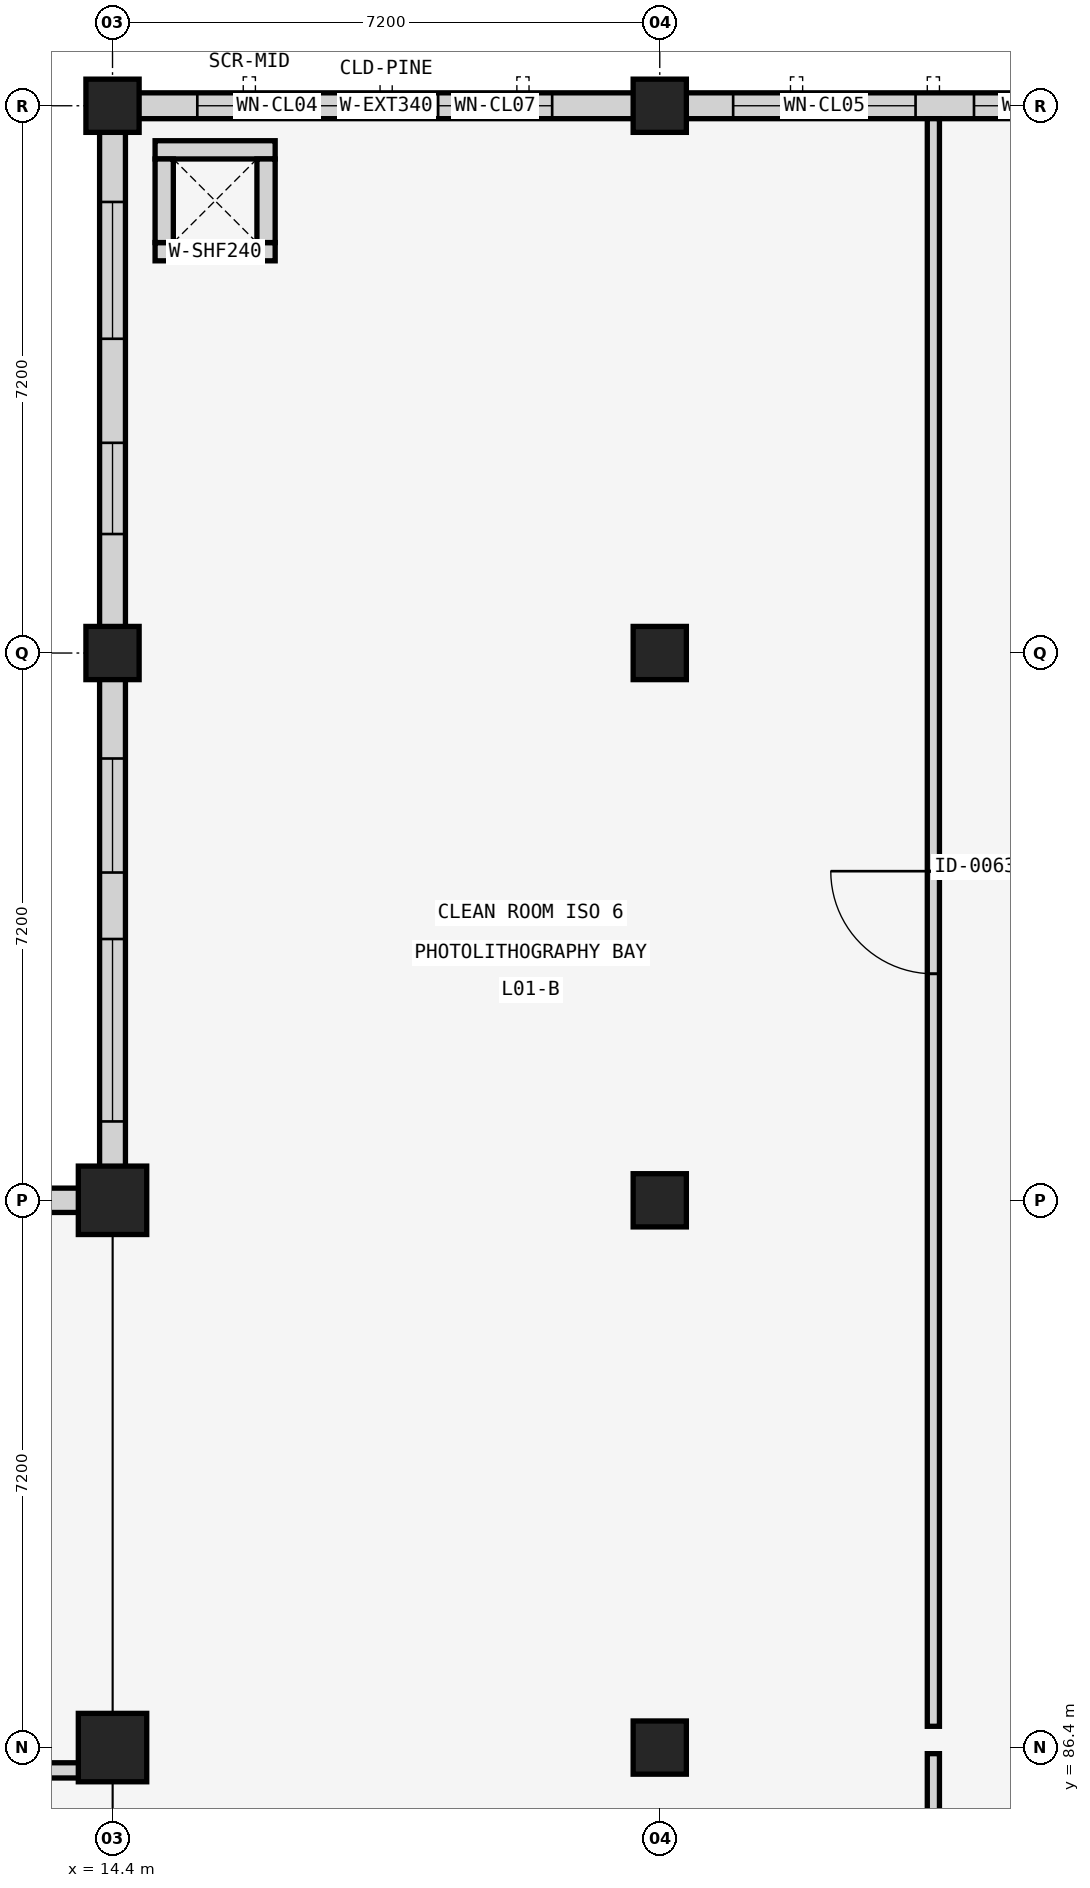
"""IFC4 building model, lengths in metres.
Left out: names, types, materials, properties, quantities, classifications, styles, units other than length and angle.
Written with IfcOpenShell. Run it as: python <this file> out.ifc"""

import sys

from ifc_helpers import new_model, si_unit, direction, frame, frame_2d, origin, origin_2d, place, context, subcontext, project, spatial, rectangle, extrude, element, fill, save


model = new_model("IFC4")
c1 = context("Model", 3, precision=1e-05, world=origin(), true_north=direction((0.0, 1.0)))
c2 = subcontext(c1, "Body", "Model", "MODEL_VIEW")
j1 = project(units=[si_unit("LENGTHUNIT", "METRE"), si_unit("PLANEANGLEUNIT", "RADIAN")], contexts=[c1])
p1 = place(None, origin())
s1 = spatial("IfcSite", under=j1, at=p1, CompositionType="ELEMENT")
p2 = place(p1, origin())
s2 = spatial("IfcBuilding", under=s1, at=p2, CompositionType="ELEMENT")
p3 = place(p2, frame((0.0, 0.0, 4.8)))
s3 = spatial("IfcBuildingStorey", under=s2, at=p3, CompositionType="ELEMENT", Elevation=4.8)
for number, where, z_axis, x_axis in (
    (1, (14.4, 86.4, 0.0), (0.0, 0.0, 1.0), (1.0, 0.0, 0.0)),
    (2, (14.4, 93.6, 0.0), (0.0, 0.0, 1.0), (1.0, 0.0, 0.0)),
):
    element("IfcColumn", number, at=place(p3, frame(where, z_axis=z_axis, x_axis=x_axis)), inside=s3, PredefinedType="COLUMN", context=c2, shape_type="SweptSolid", body=[
        extrude(rectangle(XDim=0.9, YDim=0.9, at=origin_2d()), origin(), (0.0, 0.0, 1.0), 4.16),
    ])
for number, where, z_axis, x_axis in (
    (3, (14.4, 100.8, 0.0), (0.0, 0.0, 1.0), (1.0, 0.0, 0.0)),
    (4, (14.4, 108.0, 0.0), (0.0, 0.0, 1.0), (1.0, 0.0, 0.0)),
    (5, (21.6, 86.4, 0.0), (0.0, 0.0, 1.0), (1.0, 0.0, 0.0)),
    (6, (21.6, 93.6, 0.0), (0.0, 0.0, 1.0), (1.0, 0.0, 0.0)),
    (7, (21.6, 100.8, 0.0), (0.0, 0.0, 1.0), (1.0, 0.0, 0.0)),
    (8, (21.6, 108.0, 0.0), (0.0, 0.0, 1.0), (1.0, 0.0, 0.0)),
):
    element("IfcColumn", number, at=place(p3, frame(where, z_axis=z_axis, x_axis=x_axis)), inside=s3, PredefinedType="COLUMN", context=c2, shape_type="SweptSolid", body=[
        extrude(rectangle(XDim=0.7, YDim=0.7, at=origin_2d()), origin(), (0.0, 0.0, 1.0), 4.16),
    ])
p4 = place(p3, frame((0.44, 93.6, 0.0), z_axis=(0.0, 0.0, 1.0), x_axis=(1.0, 0.0, 0.0)))
e9 = element("IfcWall", 9, at=p4, inside=s3, PredefinedType="SOLIDWALL", context=c2, shape_type="SweptSolid", body=[
    extrude(rectangle(XDim=13.52, YDim=0.32, at=frame_2d((6.76, 0.0))), origin(), (0.0, 0.0, 1.0), 3.42),
])
p5 = place(p4, frame((2.175, 0.0, 0.85)))
e10 = element("IfcOpeningElement", 10, at=p5, cuts=e9, PredefinedType="OPENING", context=c2, shape_type="SweptSolid", body=[
    extrude(rectangle(XDim=0.45, YDim=2.1, at=frame_2d((0.225, 1.05))), frame((0.0, 0.17, 0.0), z_axis=(0.0, -1.0, 0.0), x_axis=(1.0, 0.0, 0.0)), (0.0, 0.0, 1.0), 0.34),
])
p6 = place(p4, frame((4.975, 0.0, 0.85)))
e11 = element("IfcOpeningElement", 11, at=p6, cuts=e9, PredefinedType="OPENING", context=c2, shape_type="SweptSolid", body=[
    extrude(rectangle(XDim=0.45, YDim=2.4, at=frame_2d((0.225, 1.2))), frame((0.0, 0.17, 0.0), z_axis=(0.0, -1.0, 0.0), x_axis=(1.0, 0.0, 0.0)), (0.0, 0.0, 1.0), 0.34),
])
p7 = place(p4, frame((8.95, 0.0, 0.85)))
e12 = element("IfcOpeningElement", 12, at=p7, cuts=e9, PredefinedType="OPENING", context=c2, shape_type="SweptSolid", body=[
    extrude(rectangle(XDim=0.5, YDim=2.4, at=frame_2d((0.25, 1.2))), frame((0.0, 0.17, 0.0), z_axis=(0.0, -1.0, 0.0), x_axis=(1.0, 0.0, 0.0)), (0.0, 0.0, 1.0), 0.34),
])
p8 = place(p4, frame((11.725, 0.0, 0.85)))
e13 = element("IfcOpeningElement", 13, at=p8, cuts=e9, PredefinedType="OPENING", context=c2, shape_type="SweptSolid", body=[
    extrude(rectangle(XDim=0.55, YDim=2.2, at=frame_2d((0.275, 1.1))), frame((0.0, 0.17, 0.0), z_axis=(0.0, -1.0, 0.0), x_axis=(1.0, 0.0, 0.0)), (0.0, 0.0, 1.0), 0.34),
])
p9 = place(p3, frame((14.74, 108.0, 0.0), z_axis=(0.0, 0.0, 1.0), x_axis=(1.0, 0.0, 0.0)))
e14 = element("IfcWall", 14, at=p9, inside=s3, PredefinedType="SOLIDWALL", context=c2, shape_type="SweptSolid", body=[
    extrude(rectangle(XDim=6.52, YDim=0.34, at=frame_2d((3.26, 0.0))), origin(), (0.0, 0.0, 1.0), 3.42),
])
p10 = place(p9, frame((0.776, 0.0, 1.0)))
e15 = element("IfcOpeningElement", 15, at=p10, cuts=e14, PredefinedType="OPENING", context=c2, shape_type="SweptSolid", body=[
    extrude(rectangle(XDim=2.1, YDim=1.5, at=frame_2d((1.05, 0.75))), frame((0.0, 0.18, 0.0), z_axis=(0.0, -1.0, 0.0), x_axis=(1.0, 0.0, 0.0)), (0.0, 0.0, 1.0), 0.36),
])
p11 = place(p9, frame((3.944, 0.0, 1.0)))
e16 = element("IfcOpeningElement", 16, at=p11, cuts=e14, PredefinedType="OPENING", context=c2, shape_type="SweptSolid", body=[
    extrude(rectangle(XDim=1.5, YDim=1.65, at=frame_2d((0.75, 0.825))), frame((0.0, 0.18, 0.0), z_axis=(0.0, -1.0, 0.0), x_axis=(1.0, 0.0, 0.0)), (0.0, 0.0, 1.0), 0.36),
])
p12 = place(p3, frame((21.94, 108.0, 0.0), z_axis=(0.0, 0.0, 1.0), x_axis=(1.0, 0.0, 0.0)))
e17 = element("IfcWall", 17, at=p12, inside=s3, PredefinedType="SOLIDWALL", context=c2, shape_type="SweptSolid", body=[
    extrude(rectangle(XDim=6.52, YDim=0.34, at=frame_2d((3.26, 0.0))), origin(), (0.0, 0.0, 1.0), 3.21),
])
p13 = place(p12, frame((0.625, 0.0, 1.0)))
e18 = element("IfcOpeningElement", 18, at=p13, cuts=e17, PredefinedType="OPENING", context=c2, shape_type="SweptSolid", body=[
    extrude(rectangle(XDim=2.4, YDim=1.5, at=frame_2d((1.2, 0.75))), frame((0.0, 0.18, 0.0), z_axis=(0.0, -1.0, 0.0), x_axis=(1.0, 0.0, 0.0)), (0.0, 0.0, 1.0), 0.36),
])
p14 = place(p12, frame((3.794, 0.0, 1.0)))
e19 = element("IfcOpeningElement", 19, at=p14, cuts=e17, PredefinedType="OPENING", context=c2, shape_type="SweptSolid", body=[
    extrude(rectangle(XDim=1.8, YDim=1.65, at=frame_2d((0.9, 0.825))), frame((0.0, 0.18, 0.0), z_axis=(0.0, -1.0, 0.0), x_axis=(1.0, 0.0, 0.0)), (0.0, 0.0, 1.0), 0.36),
])
p15 = place(p3, frame((14.4, 94.04, 0.0), z_axis=(0.0, 0.0, 1.0), x_axis=(0.0, 1.0, 0.0)))
e20 = element("IfcWall", 20, at=p15, inside=s3, PredefinedType="SOLIDWALL", context=c2, shape_type="SweptSolid", body=[
    extrude(rectangle(XDim=6.42, YDim=0.34, at=frame_2d((3.21, 0.0))), origin(), (0.0, 0.0, 1.0), 3.21),
])
p16 = place(p15, frame((0.598, 0.0, 1.0)))
e21 = element("IfcOpeningElement", 21, at=p16, cuts=e20, PredefinedType="OPENING", context=c2, shape_type="SweptSolid", body=[
    extrude(rectangle(XDim=2.4, YDim=1.5, at=frame_2d((1.2, 0.75))), frame((0.0, 0.18, 0.0), z_axis=(0.0, -1.0, 0.0), x_axis=(1.0, 0.0, 0.0)), (0.0, 0.0, 1.0), 0.36),
])
p17 = place(p15, frame((3.872, 0.0, 1.0)))
e22 = element("IfcOpeningElement", 22, at=p17, cuts=e20, PredefinedType="OPENING", context=c2, shape_type="SweptSolid", body=[
    extrude(rectangle(XDim=1.5, YDim=1.65, at=frame_2d((0.75, 0.825))), frame((0.0, 0.18, 0.0), z_axis=(0.0, -1.0, 0.0), x_axis=(1.0, 0.0, 0.0)), (0.0, 0.0, 1.0), 0.36),
])
p18 = place(p3, frame((14.4, 101.14, 0.0), z_axis=(0.0, 0.0, 1.0), x_axis=(0.0, 1.0, 0.0)))
e23 = element("IfcWall", 23, at=p18, inside=s3, PredefinedType="SOLIDWALL", context=c2, shape_type="SweptSolid", body=[
    extrude(rectangle(XDim=6.52, YDim=0.34, at=frame_2d((3.26, 0.0))), origin(), (0.0, 0.0, 1.0), 3.21),
])
p19 = place(p18, frame((1.226, 0.0, 1.0)))
e24 = element("IfcOpeningElement", 24, at=p19, cuts=e23, PredefinedType="OPENING", context=c2, shape_type="SweptSolid", body=[
    extrude(rectangle(XDim=1.2, YDim=1.65, at=frame_2d((0.6, 0.825))), frame((0.0, 0.18, 0.0), z_axis=(0.0, -1.0, 0.0), x_axis=(1.0, 0.0, 0.0)), (0.0, 0.0, 1.0), 0.36),
])
p20 = place(p18, frame((3.794, 0.0, 1.0)))
e25 = element("IfcOpeningElement", 25, at=p20, cuts=e23, PredefinedType="OPENING", context=c2, shape_type="SweptSolid", body=[
    extrude(rectangle(XDim=1.8, YDim=1.65, at=frame_2d((0.9, 0.825))), frame((0.0, 0.18, 0.0), z_axis=(0.0, -1.0, 0.0), x_axis=(1.0, 0.0, 0.0)), (0.0, 0.0, 1.0), 0.36),
])
p21 = place(p3, frame((0.25, 86.1, 0.0), z_axis=(0.0, 0.0, 1.0), x_axis=(1.0, 0.0, 0.0)))
e26 = element("IfcWall", 26, at=p21, inside=s3, PredefinedType="PARTITIONING", context=c2, shape_type="SweptSolid", body=[
    extrude(rectangle(XDim=13.95, YDim=0.2, at=frame_2d((6.975, 0.0))), origin(), (0.0, 0.0, 1.0), 3.21),
])
p22 = place(p21, frame((4.403, 0.0, 0.0)))
e27 = element("IfcOpeningElement", 27, at=p22, cuts=e26, PredefinedType="OPENING", context=c2, shape_type="SweptSolid", body=[
    extrude(rectangle(XDim=0.96, YDim=2.15, at=frame_2d((0.48, 1.075))), frame((0.0, 0.11, 0.0), z_axis=(0.0, -1.0, 0.0), x_axis=(1.0, 0.0, 0.0)), (0.0, 0.0, 1.0), 0.22),
])
p23 = place(p3, frame((25.2, 79.28, 0.0), z_axis=(0.0, 0.0, 1.0), x_axis=(0.0, 1.0, 0.0)))
e28 = element("IfcWall", 28, at=p23, inside=s3, PredefinedType="PARTITIONING", context=c2, shape_type="SweptSolid", body=[
    extrude(rectangle(XDim=7.04, YDim=0.16, at=frame_2d((3.52, 0.0))), origin(), (0.0, 0.0, 1.0), 3.11),
])
p24 = place(p23, frame((2.92, 0.0, 0.0)))
e29 = element("IfcOpeningElement", 29, at=p24, cuts=e28, PredefinedType="OPENING", context=c2, shape_type="SweptSolid", body=[
    extrude(rectangle(XDim=1.2, YDim=2.15, at=frame_2d((0.6, 1.075))), frame((0.0, 0.09, 0.0), z_axis=(0.0, -1.0, 0.0), x_axis=(1.0, 0.0, 0.0)), (0.0, 0.0, 1.0), 0.18),
])
p25 = place(p3, frame((25.2, 86.68, 0.0), z_axis=(0.0, 0.0, 1.0), x_axis=(0.0, 1.0, 0.0)))
e30 = element("IfcWall", 30, at=p25, inside=s3, PredefinedType="PARTITIONING", context=c2, shape_type="SweptSolid", body=[
    extrude(rectangle(XDim=21.15, YDim=0.16, at=frame_2d((10.575, 0.0))), origin(), (0.0, 0.0, 1.0), 3.11),
])
p26 = place(p25, frame((9.9, 0.0, 0.0)))
e31 = element("IfcOpeningElement", 31, at=p26, cuts=e30, PredefinedType="OPENING", context=c2, shape_type="SweptSolid", body=[
    extrude(rectangle(XDim=1.35, YDim=2.2, at=frame_2d((0.675, 1.1))), frame((0.0, 0.09, 0.0), z_axis=(0.0, -1.0, 0.0), x_axis=(1.0, 0.0, 0.0)), (0.0, 0.0, 1.0), 0.18),
])
for number, where, z_axis, x_axis in (
    (32, (14.96, 106.08, 0.0), (0.0, 0.0, 1.0), (1.0, 0.0, 0.0)),
    (33, (14.96, 107.42, 0.0), (0.0, 0.0, 1.0), (1.0, 0.0, 0.0)),
):
    element("IfcWall", number, at=place(p3, frame(where, z_axis=z_axis, x_axis=x_axis)), inside=s3, PredefinedType="SOLIDWALL", context=c2, shape_type="SweptSolid", body=[
        extrude(rectangle(XDim=1.58, YDim=0.24, at=frame_2d((0.79, 0.0))), origin(), (0.0, 0.0, 1.0), 3.81),
    ])
for number, where, z_axis, x_axis in (
    (34, (15.08, 106.2, 0.0), (0.0, 0.0, 1.0), (0.0, 1.0, 0.0)),
    (35, (16.42, 106.2, 0.0), (0.0, 0.0, 1.0), (0.0, 1.0, 0.0)),
):
    element("IfcWall", number, at=place(p3, frame(where, z_axis=z_axis, x_axis=x_axis)), inside=s3, PredefinedType="SOLIDWALL", context=c2, shape_type="SweptSolid", body=[
        extrude(rectangle(XDim=1.1, YDim=0.24, at=frame_2d((0.55, 0.0))), origin(), (0.0, 0.0, 1.0), 3.81),
    ])
p27 = place(p10, origin())
e36 = element("IfcWindow", 36, at=p27, inside=s3, PartitioningType="SINGLE_PANEL", PredefinedType="WINDOW", context=c2, shape_type="SweptSolid", body=[
    extrude(rectangle(XDim=2.1, YDim=1.5, at=frame_2d((1.05, 0.75))), frame((0.0, 0.03, 0.0), z_axis=(0.0, -1.0, 0.0), x_axis=(1.0, 0.0, 0.0)), (0.0, 0.0, 1.0), 0.06),
])
fill(e15, e36)
p28 = place(p11, origin())
e37 = element("IfcWindow", 37, at=p28, inside=s3, PartitioningType="SINGLE_PANEL", PredefinedType="WINDOW", context=c2, shape_type="SweptSolid", body=[
    extrude(rectangle(XDim=1.5, YDim=1.65, at=frame_2d((0.75, 0.825))), frame((0.0, 0.03, 0.0), z_axis=(0.0, -1.0, 0.0), x_axis=(1.0, 0.0, 0.0)), (0.0, 0.0, 1.0), 0.06),
])
fill(e16, e37)
p29 = place(p13, origin())
e38 = element("IfcWindow", 38, at=p29, inside=s3, PartitioningType="SINGLE_PANEL", PredefinedType="WINDOW", context=c2, shape_type="SweptSolid", body=[
    extrude(rectangle(XDim=2.4, YDim=1.5, at=frame_2d((1.2, 0.75))), frame((0.0, 0.03, 0.0), z_axis=(0.0, -1.0, 0.0), x_axis=(1.0, 0.0, 0.0)), (0.0, 0.0, 1.0), 0.06),
])
fill(e18, e38)
p30 = place(p14, origin())
e39 = element("IfcWindow", 39, at=p30, inside=s3, PartitioningType="SINGLE_PANEL", PredefinedType="WINDOW", context=c2, shape_type="SweptSolid", body=[
    extrude(rectangle(XDim=1.8, YDim=1.65, at=frame_2d((0.9, 0.825))), frame((0.0, 0.03, 0.0), z_axis=(0.0, -1.0, 0.0), x_axis=(1.0, 0.0, 0.0)), (0.0, 0.0, 1.0), 0.06),
])
fill(e19, e39)
p31 = place(p16, origin())
e40 = element("IfcWindow", 40, at=p31, inside=s3, PartitioningType="SINGLE_PANEL", PredefinedType="WINDOW", context=c2, shape_type="SweptSolid", body=[
    extrude(rectangle(XDim=2.4, YDim=1.5, at=frame_2d((1.2, 0.75))), frame((0.0, 0.03, 0.0), z_axis=(0.0, -1.0, 0.0), x_axis=(1.0, 0.0, 0.0)), (0.0, 0.0, 1.0), 0.06),
])
fill(e21, e40)
p32 = place(p17, origin())
e41 = element("IfcWindow", 41, at=p32, inside=s3, PartitioningType="SINGLE_PANEL", PredefinedType="WINDOW", context=c2, shape_type="SweptSolid", body=[
    extrude(rectangle(XDim=1.5, YDim=1.65, at=frame_2d((0.75, 0.825))), frame((0.0, 0.03, 0.0), z_axis=(0.0, -1.0, 0.0), x_axis=(1.0, 0.0, 0.0)), (0.0, 0.0, 1.0), 0.06),
])
fill(e22, e41)
p33 = place(p19, origin())
e42 = element("IfcWindow", 42, at=p33, inside=s3, PartitioningType="SINGLE_PANEL", PredefinedType="WINDOW", context=c2, shape_type="SweptSolid", body=[
    extrude(rectangle(XDim=1.2, YDim=1.65, at=frame_2d((0.6, 0.825))), frame((0.0, 0.03, 0.0), z_axis=(0.0, -1.0, 0.0), x_axis=(1.0, 0.0, 0.0)), (0.0, 0.0, 1.0), 0.06),
])
fill(e24, e42)
p34 = place(p20, origin())
e43 = element("IfcWindow", 43, at=p34, inside=s3, PartitioningType="SINGLE_PANEL", PredefinedType="WINDOW", context=c2, shape_type="SweptSolid", body=[
    extrude(rectangle(XDim=1.8, YDim=1.65, at=frame_2d((0.9, 0.825))), frame((0.0, 0.03, 0.0), z_axis=(0.0, -1.0, 0.0), x_axis=(1.0, 0.0, 0.0)), (0.0, 0.0, 1.0), 0.06),
])
fill(e25, e43)
p35 = place(p26, origin())
e44 = element("IfcDoor", 44, at=p35, inside=s3, OperationType="SINGLE_SWING_RIGHT", PredefinedType="DOOR", context=c2, shape_type="SweptSolid", body=[
    extrude(rectangle(XDim=1.35, YDim=2.2, at=frame_2d((0.675, 1.1))), frame((0.0, 0.025, 0.0), z_axis=(0.0, -1.0, 0.0), x_axis=(1.0, 0.0, 0.0)), (0.0, 0.0, 1.0), 0.05),
])
fill(e31, e44)
save(model, sys.argv[1])
